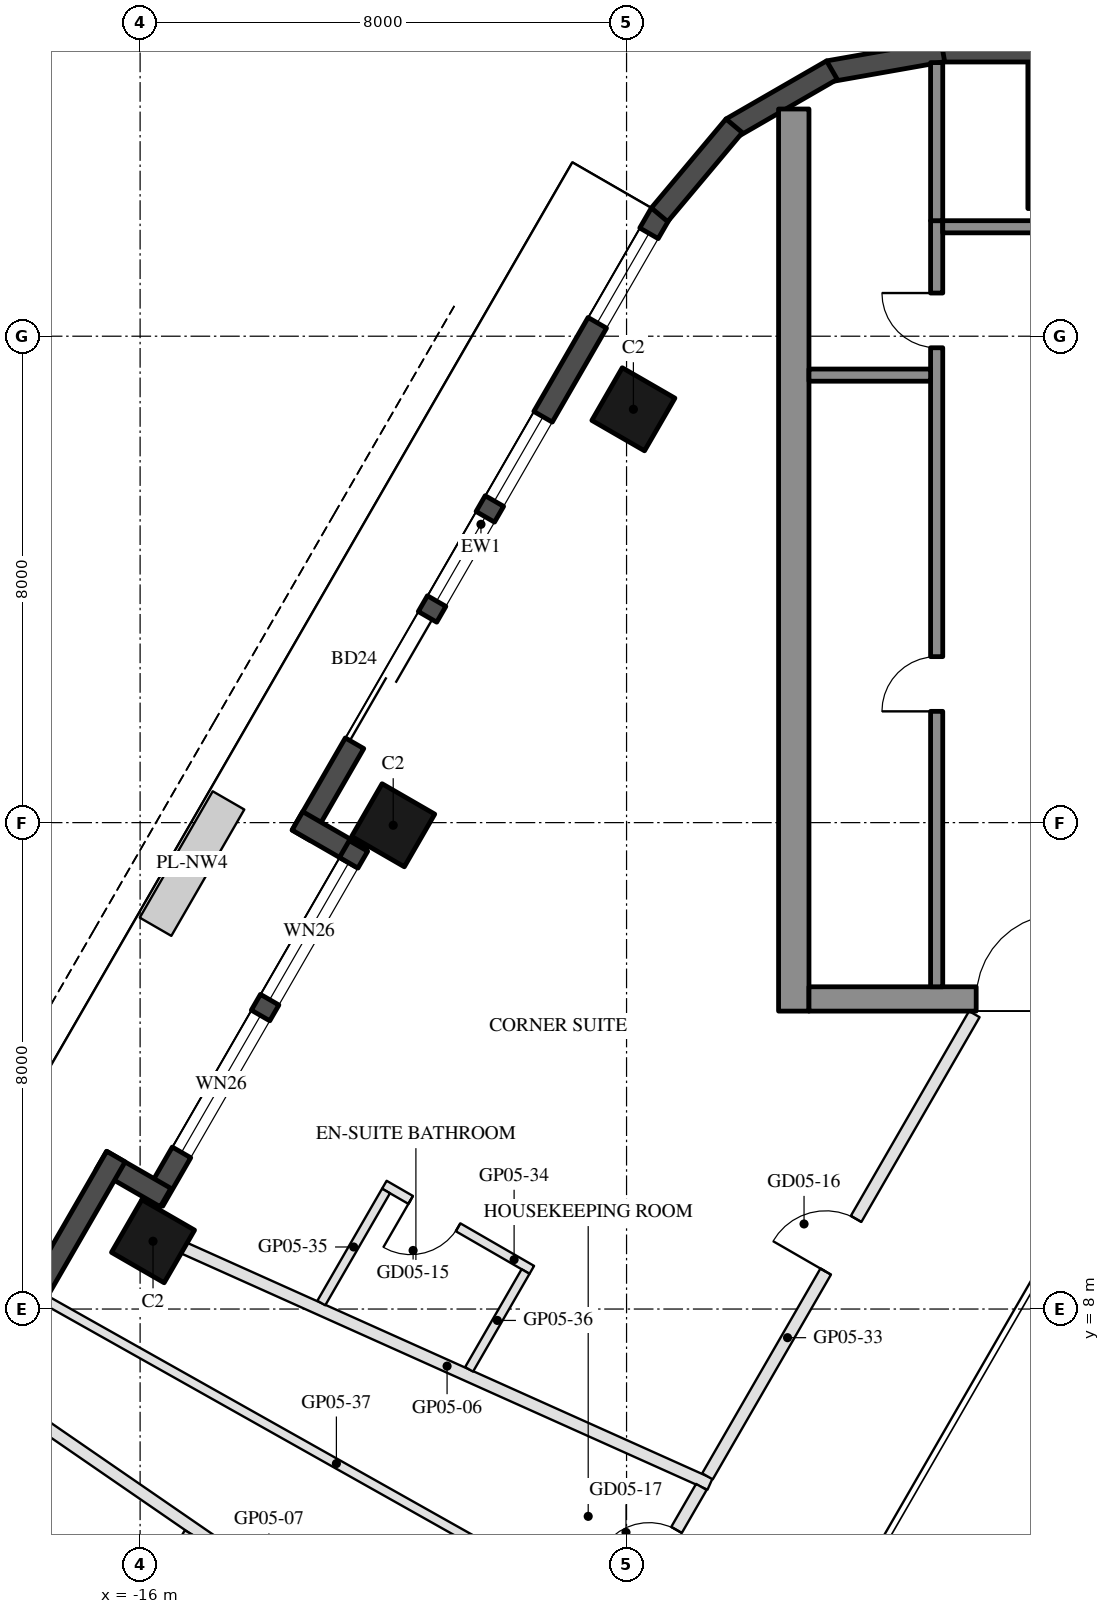
"""IFC4 building model, lengths in metres.
Left out: names, types, materials, properties, quantities, classifications, styles, units other than length and angle.
Written with IfcOpenShell. Run it as: python <this file> out.ifc"""

import sys

from ifc_helpers import new_model, si_unit, direction, frame, frame_2d, origin, origin_2d, place, context, subcontext, project, spatial, rectangle, hollow_rectangle, extrude, element, fill, save


model = new_model("IFC4")
c1 = context("Model", 3, precision=1e-05, world=origin(), true_north=direction((0.0, 1.0)))
c2 = subcontext(c1, "Body", "Model", "MODEL_VIEW")
j1 = project(units=[si_unit("LENGTHUNIT", "METRE"), si_unit("PLANEANGLEUNIT", "RADIAN")], contexts=[c1])
p1 = place(None, origin())
s1 = spatial("IfcSite", under=j1, at=p1, CompositionType="ELEMENT")
p2 = place(p1, origin())
s2 = spatial("IfcBuilding", under=s1, at=p2, CompositionType="ELEMENT")
p3 = place(p2, frame((0.0, 0.0, 79.8)))
s3 = spatial("IfcBuildingStorey", under=s2, at=p3, CompositionType="ELEMENT", Elevation=79.8)
for number, where, z_axis, x_axis in (
    (1, (-7.888, 22.798, 0.0), (0.0, 0.0, 1.0), (0.5, 0.866, 0.0)),
    (2, (-11.838, 15.957, 0.0), (0.0, 0.0, 1.0), (0.5, 0.866, 0.0)),
    (3, (-15.788, 9.115, 0.0), (0.0, 0.0, 1.0), (0.5, 0.866, 0.0)),
):
    element("IfcColumn", number, at=place(p3, frame(where, z_axis=z_axis, x_axis=x_axis)), inside=s3, PredefinedType="COLUMN", context=c2, shape_type="SweptSolid", body=[
        extrude(hollow_rectangle(XDim=1.0, YDim=1.0, WallThickness=0.045, at=origin_2d()), origin(), (0.0, 0.0, 1.0), 3.7),
    ])
p4 = place(p3, frame((0.0, 27.3, 0.0), z_axis=(0.0, 0.0, 1.0), x_axis=(1.0, 0.0, 0.0)))
e4 = element("IfcColumn", 4, at=p4, inside=s3, PredefinedType="COLUMN", context=c2, shape_type="SweptSolid", body=[
    extrude(hollow_rectangle(XDim=2.8, YDim=2.4, WallThickness=0.07, at=origin_2d()), origin(), (0.0, 0.0, 1.0), 3.7),
])
p5 = place(p3, frame((-7.441, 26.022, 0.0), z_axis=(0.0, 0.0, 1.0), x_axis=(-0.499992533062, -0.86602971478, 0.0)))
e5 = element("IfcWall", 5, at=p5, inside=s3, PredefinedType="SOLIDWALL", context=c2, shape_type="SweptSolid", body=[
    extrude(rectangle(XDim=11.816, YDim=0.35, at=frame_2d((5.908, 0.0))), origin(), (0.0, 0.0, 1.0), 3.55),
])
p6 = place(p5, frame((0.381, 0.0, 0.3)))
e6 = element("IfcOpeningElement", 6, at=p6, cuts=e5, PredefinedType="OPENING", context=c2, shape_type="SweptSolid", body=[
    extrude(rectangle(XDim=1.7, YDim=2.65, at=frame_2d((0.85, 1.325))), frame((0.0, 0.185, 0.0), z_axis=(0.0, -1.0, 0.0), x_axis=(1.0, 0.0, 0.0)), (0.0, 0.0, 1.0), 0.37),
])
p7 = place(p5, frame((7.666, 0.0, 0.0)))
e7 = element("IfcOpeningElement", 7, at=p7, cuts=e5, PredefinedType="OPENING", context=c2, shape_type="SweptSolid", body=[
    extrude(rectangle(XDim=2.4, YDim=2.4, at=frame_2d((1.2, 1.2))), frame((0.0, 0.185, 0.0), z_axis=(0.0, -1.0, 0.0), x_axis=(1.0, 0.0, 0.0)), (0.0, 0.0, 1.0), 0.37),
])
p8 = place(p5, frame((3.865, 0.0, 0.3)))
e8 = element("IfcOpeningElement", 8, at=p8, cuts=e5, PredefinedType="OPENING", context=c2, shape_type="SweptSolid", body=[
    extrude(rectangle(XDim=1.6, YDim=2.65, at=frame_2d((0.8, 1.325))), frame((0.0, 0.185, 0.0), z_axis=(0.0, -1.0, 0.0), x_axis=(1.0, 0.0, 0.0)), (0.0, 0.0, 1.0), 0.37),
])
p9 = place(p5, frame((5.765, 0.0, 0.3)))
e9 = element("IfcOpeningElement", 9, at=p9, cuts=e5, PredefinedType="OPENING", context=c2, shape_type="SweptSolid", body=[
    extrude(rectangle(XDim=1.6, YDim=2.65, at=frame_2d((0.8, 1.325))), frame((0.0, 0.185, 0.0), z_axis=(0.0, -1.0, 0.0), x_axis=(1.0, 0.0, 0.0)), (0.0, 0.0, 1.0), 0.37),
])
p10 = place(p3, frame((-13.413, 16.029, 0.0), z_axis=(0.0, 0.0, 1.0), x_axis=(0.866005645448, -0.500034220881, 0.0)))
e10 = element("IfcWall", 10, at=p10, inside=s3, PredefinedType="SOLIDWALL", context=c2, shape_type="SweptSolid", body=[
    extrude(rectangle(XDim=1.22, YDim=0.35, at=frame_2d((0.61, 0.0))), origin(), (0.0, 0.0, 1.0), 3.55),
])
p11 = place(p3, frame((-12.409, 15.617, 0.0), z_axis=(0.0, 0.0, 1.0), x_axis=(-0.500003597184, -0.866023326939, 0.0)))
e11 = element("IfcWall", 11, at=p11, inside=s3, PredefinedType="SOLIDWALL", context=c2, shape_type="SweptSolid", body=[
    extrude(rectangle(XDim=6.74, YDim=0.35, at=frame_2d((3.37, 0.0))), origin(), (0.0, 0.0, 1.0), 3.55),
])
p12 = place(p11, frame((0.32, 0.0, 0.3)))
e12 = element("IfcOpeningElement", 12, at=p12, cuts=e11, PredefinedType="OPENING", context=c2, shape_type="SweptSolid", body=[
    extrude(rectangle(XDim=2.6, YDim=2.65, at=frame_2d((1.3, 1.325))), frame((0.0, 0.185, 0.0), z_axis=(0.0, -1.0, 0.0), x_axis=(1.0, 0.0, 0.0)), (0.0, 0.0, 1.0), 0.37),
])
p13 = place(p11, frame((3.22, 0.0, 0.3)))
e13 = element("IfcOpeningElement", 13, at=p13, cuts=e11, PredefinedType="OPENING", context=c2, shape_type="SweptSolid", body=[
    extrude(rectangle(XDim=2.6, YDim=2.65, at=frame_2d((1.3, 1.325))), frame((0.0, 0.185, 0.0), z_axis=(0.0, -1.0, 0.0), x_axis=(1.0, 0.0, 0.0)), (0.0, 0.0, 1.0), 0.37),
])
p14 = place(p3, frame((-15.581, 9.833, 0.0), z_axis=(0.0, 0.0, 1.0), x_axis=(-0.866055662726, 0.499947586314, 0.0)))
e14 = element("IfcWall", 14, at=p14, inside=s3, PredefinedType="SOLIDWALL", context=c2, shape_type="SweptSolid", body=[
    extrude(rectangle(XDim=1.22, YDim=0.35, at=frame_2d((0.61, 0.0))), origin(), (0.0, 0.0, 1.0), 3.55),
])
p15 = place(p3, frame((-16.398, 10.507, 0.0), z_axis=(0.0, 0.0, 1.0), x_axis=(-0.499999142773, -0.866025898704, 0.0)))
e15 = element("IfcWall", 15, at=p15, inside=s3, PredefinedType="SOLIDWALL", context=c2, shape_type="SweptSolid", body=[
    extrude(rectangle(XDim=9.7, YDim=0.35, at=frame_2d((4.85, 0.0))), origin(), (0.0, 0.0, 1.0), 3.55),
])
p16 = place(p15, frame((4.79, 0.0, 0.3)))
e16 = element("IfcOpeningElement", 16, at=p16, cuts=e15, PredefinedType="OPENING", context=c2, shape_type="SweptSolid", body=[
    extrude(rectangle(XDim=3.1, YDim=2.65, at=frame_2d((1.55, 1.325))), frame((0.0, 0.185, 0.0), z_axis=(0.0, -1.0, 0.0), x_axis=(1.0, 0.0, 0.0)), (0.0, 0.0, 1.0), 0.37),
])
p17 = place(p3, frame((2.829, 28.685, 0.0), z_axis=(0.0, 0.0, 1.0), x_axis=(-1.0, 0.0, 0.0)))
e17 = element("IfcWall", 17, at=p17, inside=s3, PredefinedType="SOLIDWALL", context=c2, shape_type="SweptSolid", body=[
    extrude(rectangle(XDim=5.658, YDim=0.35, at=frame_2d((2.829, 0.0))), origin(), (0.0, 0.0, 1.0), 3.55),
])
for number, where, z_axis, x_axis in (
    (18, (-2.799, 28.688, 0.0), (0.0, 0.0, 1.0), (-0.985, -0.174, 0.0)),
    (19, (-4.623, 28.377, 0.0), (0.0, 0.0, 1.0), (-0.866, -0.5, 0.0)),
):
    element("IfcWall", number, at=place(p3, frame(where, z_axis=z_axis, x_axis=x_axis)), inside=s3, PredefinedType="SOLIDWALL", context=c2, shape_type="SweptSolid", body=[
        extrude(rectangle(XDim=1.91, YDim=0.35, at=frame_2d((0.955, 0.0))), origin(), (0.0, 0.0, 1.0), 3.55),
    ])
p18 = place(p3, frame((-6.23, 27.461, 0.0), z_axis=(0.0, 0.0, 1.0), x_axis=(-0.642808304945, -0.766027077259, 0.0)))
e20 = element("IfcWall", 20, at=p18, inside=s3, PredefinedType="SOLIDWALL", context=c2, shape_type="SweptSolid", body=[
    extrude(rectangle(XDim=1.91, YDim=0.35, at=frame_2d((0.955, 0.0))), origin(), (0.0, 0.0, 1.0), 3.55),
])
p19 = place(p3, frame((-5.25, 12.9, 0.0), z_axis=(0.0, 0.0, 1.0), x_axis=(0.0, 1.0, 0.0)))
e21 = element("IfcWall", 21, at=p19, inside=s3, PredefinedType="SHEAR", context=c2, shape_type="SweptSolid", body=[
    extrude(rectangle(XDim=14.837, YDim=0.5, at=frame_2d((7.418, 0.0))), origin(), (0.0, 0.0, 1.0), 3.5),
])
p20 = place(p3, frame((5.0, 13.1, 0.0), z_axis=(0.0, 0.0, 1.0), x_axis=(-1.0, 0.0, 0.0)))
e22 = element("IfcWall", 22, at=p20, inside=s3, PredefinedType="SHEAR", context=c2, shape_type="SweptSolid", body=[
    extrude(rectangle(XDim=10.0, YDim=0.4, at=frame_2d((5.0, 0.0))), origin(), (0.0, 0.0, 1.0), 3.5),
])
p21 = place(p20, frame((3.55, 0.0, 0.0)))
e23 = element("IfcOpeningElement", 23, at=p21, cuts=e22, PredefinedType="OPENING", context=c2, shape_type="SweptSolid", body=[
    extrude(rectangle(XDim=1.1, YDim=2.1, at=frame_2d((0.55, 1.05))), frame((0.0, 0.21, 0.0), z_axis=(0.0, -1.0, 0.0), x_axis=(1.0, 0.0, 0.0)), (0.0, 0.0, 1.0), 0.42),
])
p22 = place(p20, frame((5.85, 0.0, 0.0)))
e24 = element("IfcOpeningElement", 24, at=p22, cuts=e22, PredefinedType="OPENING", context=c2, shape_type="SweptSolid", body=[
    extrude(rectangle(XDim=1.4, YDim=2.1, at=frame_2d((0.7, 1.05))), frame((0.0, 0.21, 0.0), z_axis=(0.0, -1.0, 0.0), x_axis=(1.0, 0.0, 0.0)), (0.0, 0.0, 1.0), 0.42),
])
p23 = place(p3, frame((-2.9, 13.3, 0.0), z_axis=(0.0, 0.0, 1.0), x_axis=(0.0, 1.0, 0.0)))
e25 = element("IfcWall", 25, at=p23, inside=s3, PredefinedType="SHEAR", context=c2, shape_type="SweptSolid", body=[
    extrude(rectangle(XDim=12.6, YDim=0.2, at=frame_2d((6.3, 0.0))), origin(), (0.0, 0.0, 1.0), 3.5),
])
p24 = place(p23, frame((4.53, 0.0, 0.0)))
e26 = element("IfcOpeningElement", 26, at=p24, cuts=e25, PredefinedType="OPENING", context=c2, shape_type="SweptSolid", body=[
    extrude(rectangle(XDim=0.9, YDim=2.1, at=frame_2d((0.45, 1.05))), frame((0.0, 0.11, 0.0), z_axis=(0.0, -1.0, 0.0), x_axis=(1.0, 0.0, 0.0)), (0.0, 0.0, 1.0), 0.22),
])
p25 = place(p23, frame((10.51, 0.0, 0.0)))
e27 = element("IfcOpeningElement", 27, at=p25, cuts=e25, PredefinedType="OPENING", context=c2, shape_type="SweptSolid", body=[
    extrude(rectangle(XDim=0.9, YDim=2.1, at=frame_2d((0.45, 1.05))), frame((0.0, 0.11, 0.0), z_axis=(0.0, -1.0, 0.0), x_axis=(1.0, 0.0, 0.0)), (0.0, 0.0, 1.0), 0.22),
])
p26 = place(p3, frame((-0.4, 25.8, 0.0), z_axis=(0.0, 0.0, 1.0), x_axis=(-1.0, 0.0, 0.0)))
e28 = element("IfcWall", 28, at=p26, inside=s3, PredefinedType="SHEAR", context=c2, shape_type="SweptSolid", body=[
    extrude(rectangle(XDim=2.4, YDim=0.2, at=frame_2d((1.2, 0.0))), origin(), (0.0, 0.0, 1.0), 3.5),
])
p27 = place(p3, frame((-3.0, 23.36, 0.0), z_axis=(0.0, 0.0, 1.0), x_axis=(-1.0, 0.0, 0.0)))
e29 = element("IfcWall", 29, at=p27, inside=s3, PredefinedType="SHEAR", context=c2, shape_type="SweptSolid", body=[
    extrude(rectangle(XDim=2.0, YDim=0.2, at=frame_2d((1.0, 0.0))), origin(), (0.0, 0.0, 1.0), 3.5),
])
p28 = place(p3, frame((-2.9, 25.9, 0.0), z_axis=(0.0, 0.0, 1.0), x_axis=(0.0, 1.0, 0.0)))
e30 = element("IfcWall", 30, at=p28, inside=s3, PredefinedType="SHEAR", context=c2, shape_type="SweptSolid", body=[
    extrude(rectangle(XDim=2.6, YDim=0.2, at=frame_2d((1.3, 0.0))), origin(), (0.0, 0.0, 1.0), 3.5),
])
p29 = place(p3, frame((-15.275, 9.002, 0.0), z_axis=(0.0, 0.0, 1.0), x_axis=(0.912310970981, -0.409498097954, 0.0)))
e31 = element("IfcWall", 31, at=p29, inside=s3, PredefinedType="PARTITIONING", context=c2, shape_type="SweptSolid", body=[
    extrude(rectangle(XDim=9.479, YDim=0.2, at=frame_2d((4.74, 0.0))), origin(), (0.0, 0.0, 1.0), 2.95),
])
p30 = place(p3, frame((-18.417, 6.661, 0.0), z_axis=(0.0, 0.0, 1.0), x_axis=(0.823524858714, -0.56728018393, 0.0)))
e32 = element("IfcWall", 32, at=p30, inside=s3, PredefinedType="PARTITIONING", context=c2, shape_type="SweptSolid", body=[
    extrude(rectangle(XDim=11.015, YDim=0.2, at=frame_2d((5.507, 0.0))), origin(), (0.0, 0.0, 1.0), 2.95),
])
p31 = place(p3, frame((-6.669, 5.249, 0.0), z_axis=(0.0, 0.0, 1.0), x_axis=(0.499992114976, 0.866029956157, 0.0)))
e33 = element("IfcWall", 33, at=p31, inside=s3, PredefinedType="PARTITIONING", context=c2, shape_type="SweptSolid", body=[
    extrude(rectangle(XDim=8.778, YDim=0.2, at=frame_2d((4.389, 0.0))), origin(), (0.0, 0.0, 1.0), 2.95),
])
p32 = place(p31, frame((3.889, 0.0, 0.0)))
e34 = element("IfcOpeningElement", 34, at=p32, cuts=e33, PredefinedType="OPENING", context=c2, shape_type="SweptSolid", body=[
    extrude(rectangle(XDim=1.0, YDim=2.1, at=frame_2d((0.5, 1.05))), frame((0.0, 0.11, 0.0), z_axis=(0.0, -1.0, 0.0), x_axis=(1.0, 0.0, 0.0)), (0.0, 0.0, 1.0), 0.22),
])
p33 = place(p3, frame((-9.558, 8.645, 0.0), z_axis=(0.0, 0.0, 1.0), x_axis=(-0.866034573852, 0.49998411664, 0.0)))
e35 = element("IfcWall", 35, at=p33, inside=s3, PredefinedType="PARTITIONING", context=c2, shape_type="SweptSolid", body=[
    extrude(rectangle(XDim=2.8, YDim=0.15, at=frame_2d((1.4, 0.0))), origin(), (0.0, 0.0, 1.0), 3.55),
])
p34 = place(p33, frame((1.4, 0.0, 0.0)))
e36 = element("IfcOpeningElement", 36, at=p34, cuts=e35, PredefinedType="OPENING", context=c2, shape_type="SweptSolid", body=[
    extrude(rectangle(XDim=0.9, YDim=2.1, at=frame_2d((0.45, 1.05))), frame((0.0, 0.085, 0.0), z_axis=(0.0, -1.0, 0.0), x_axis=(1.0, 0.0, 0.0)), (0.0, 0.0, 1.0), 0.17),
])
p35 = place(p3, frame((-11.956, 9.942, 0.0), z_axis=(0.0, 0.0, 1.0), x_axis=(-0.50001378257, -0.866017446268, 0.0)))
e37 = element("IfcWall", 37, at=p35, inside=s3, PredefinedType="PARTITIONING", context=c2, shape_type="SweptSolid", body=[
    extrude(rectangle(XDim=2.128, YDim=0.15, at=frame_2d((1.064, 0.0))), origin(), (0.0, 0.0, 1.0), 3.55),
])
p36 = place(p3, frame((-9.661, 8.617, 0.0), z_axis=(0.0, 0.0, 1.0), x_axis=(-0.499984136491, -0.866034562392, 0.0)))
e38 = element("IfcWall", 38, at=p36, inside=s3, PredefinedType="PARTITIONING", context=c2, shape_type="SweptSolid", body=[
    extrude(rectangle(XDim=1.857, YDim=0.15, at=frame_2d((0.929, 0.0))), origin(), (0.0, 0.0, 1.0), 3.55),
])
p37 = place(p3, frame((-17.557, 8.15, 0.0), z_axis=(0.0, 0.0, 1.0), x_axis=(0.87154168957, -0.490321408202, 0.0)))
e39 = element("IfcWall", 39, at=p37, inside=s3, PredefinedType="PARTITIONING", context=c2, shape_type="SweptSolid", body=[
    extrude(rectangle(XDim=10.981, YDim=0.15, at=frame_2d((5.49, 0.0))), origin(), (0.0, 0.0, 1.0), 2.96),
])
p38 = place(p3, frame((-8.037, 2.88, 0.0), z_axis=(0.0, 0.0, 1.0), x_axis=(0.500025521233, 0.866010668592, 0.0)))
e40 = element("IfcWall", 40, at=p38, inside=s3, PredefinedType="PARTITIONING", context=c2, shape_type="SweptSolid", body=[
    extrude(rectangle(XDim=2.533, YDim=0.2, at=frame_2d((1.267, 0.0))), origin(), (0.0, 0.0, 1.0), 2.95),
])
p39 = place(p38, frame((0.817, 0.0, 0.0)))
e41 = element("IfcOpeningElement", 41, at=p39, cuts=e40, PredefinedType="OPENING", context=c2, shape_type="SweptSolid", body=[
    extrude(rectangle(XDim=0.9, YDim=2.1, at=frame_2d((0.45, 1.05))), frame((0.0, 0.11, 0.0), z_axis=(0.0, -1.0, 0.0), x_axis=(1.0, 0.0, 0.0)), (0.0, 0.0, 1.0), 0.22),
])
p40 = place(p3, frame((-15.2, 4.323, 0.0), z_axis=(0.0, 0.0, 1.0), x_axis=(-0.499974592989, -0.866040072032, 0.0)))
e42 = element("IfcWall", 42, at=p40, inside=s3, PredefinedType="PARTITIONING", context=c2, shape_type="SweptSolid", body=[
    extrude(rectangle(XDim=2.067, YDim=0.15, at=frame_2d((1.034, 0.0))), origin(), (0.0, 0.0, 1.0), 2.95),
])
p41 = place(p6, origin())
e43 = element("IfcWindow", 43, at=p41, inside=s3, PartitioningType="SINGLE_PANEL", PredefinedType="WINDOW", context=c2, shape_type="SweptSolid", body=[
    extrude(rectangle(XDim=1.7, YDim=2.65, at=frame_2d((0.85, 1.325))), frame((0.0, 0.03, 0.0), z_axis=(0.0, -1.0, 0.0), x_axis=(1.0, 0.0, 0.0)), (0.0, 0.0, 1.0), 0.06),
])
fill(e6, e43)
p42 = place(p7, frame((2.4, 0.0, 0.0), z_axis=(0.0, 0.0, 1.0), x_axis=(-1.0, 0.0, 0.0)))
e44 = element("IfcDoor", 44, at=p42, inside=s3, OperationType="SLIDING_TO_LEFT", PredefinedType="DOOR", context=c2, shape_type="SweptSolid", body=[
    extrude(rectangle(XDim=2.4, YDim=2.4, at=frame_2d((1.2, 1.2))), frame((0.0, 0.025, 0.0), z_axis=(0.0, -1.0, 0.0), x_axis=(1.0, 0.0, 0.0)), (0.0, 0.0, 1.0), 0.05),
])
fill(e7, e44)
p43 = place(p8, origin())
e45 = element("IfcWindow", 45, at=p43, inside=s3, PartitioningType="SINGLE_PANEL", PredefinedType="WINDOW", context=c2, shape_type="SweptSolid", body=[
    extrude(rectangle(XDim=1.6, YDim=2.65, at=frame_2d((0.8, 1.325))), frame((0.0, 0.03, 0.0), z_axis=(0.0, -1.0, 0.0), x_axis=(1.0, 0.0, 0.0)), (0.0, 0.0, 1.0), 0.06),
])
fill(e8, e45)
p44 = place(p9, origin())
e46 = element("IfcWindow", 46, at=p44, inside=s3, PartitioningType="SINGLE_PANEL", PredefinedType="WINDOW", context=c2, shape_type="SweptSolid", body=[
    extrude(rectangle(XDim=1.6, YDim=2.65, at=frame_2d((0.8, 1.325))), frame((0.0, 0.03, 0.0), z_axis=(0.0, -1.0, 0.0), x_axis=(1.0, 0.0, 0.0)), (0.0, 0.0, 1.0), 0.06),
])
fill(e9, e46)
p45 = place(p12, origin())
e47 = element("IfcWindow", 47, at=p45, inside=s3, PartitioningType="SINGLE_PANEL", PredefinedType="WINDOW", context=c2, shape_type="SweptSolid", body=[
    extrude(rectangle(XDim=2.6, YDim=2.65, at=frame_2d((1.3, 1.325))), frame((0.0, 0.03, 0.0), z_axis=(0.0, -1.0, 0.0), x_axis=(1.0, 0.0, 0.0)), (0.0, 0.0, 1.0), 0.06),
])
fill(e12, e47)
p46 = place(p13, origin())
e48 = element("IfcWindow", 48, at=p46, inside=s3, PartitioningType="SINGLE_PANEL", PredefinedType="WINDOW", context=c2, shape_type="SweptSolid", body=[
    extrude(rectangle(XDim=2.6, YDim=2.65, at=frame_2d((1.3, 1.325))), frame((0.0, 0.03, 0.0), z_axis=(0.0, -1.0, 0.0), x_axis=(1.0, 0.0, 0.0)), (0.0, 0.0, 1.0), 0.06),
])
fill(e13, e48)
p47 = place(p24, origin())
e49 = element("IfcDoor", 49, at=p47, inside=s3, OperationType="SINGLE_SWING_LEFT", PredefinedType="DOOR", context=c2, shape_type="SweptSolid", body=[
    extrude(rectangle(XDim=0.9, YDim=2.1, at=frame_2d((0.45, 1.05))), frame((0.0, 0.025, 0.0), z_axis=(0.0, -1.0, 0.0), x_axis=(1.0, 0.0, 0.0)), (0.0, 0.0, 1.0), 0.05),
])
fill(e26, e49)
p48 = place(p25, origin())
e50 = element("IfcDoor", 50, at=p48, inside=s3, OperationType="SINGLE_SWING_RIGHT", PredefinedType="DOOR", context=c2, shape_type="SweptSolid", body=[
    extrude(rectangle(XDim=0.9, YDim=2.1, at=frame_2d((0.45, 1.05))), frame((0.0, 0.025, 0.0), z_axis=(0.0, -1.0, 0.0), x_axis=(1.0, 0.0, 0.0)), (0.0, 0.0, 1.0), 0.05),
])
fill(e27, e50)
p49 = place(p22, frame((1.4, 0.0, 0.0), z_axis=(0.0, 0.0, 1.0), x_axis=(-1.0, 0.0, 0.0)))
e51 = element("IfcDoor", 51, at=p49, inside=s3, OperationType="DOUBLE_DOOR_SINGLE_SWING", PredefinedType="DOOR", context=c2, shape_type="SweptSolid", body=[
    extrude(rectangle(XDim=1.4, YDim=2.1, at=frame_2d((0.7, 1.05))), frame((0.0, 0.025, 0.0), z_axis=(0.0, -1.0, 0.0), x_axis=(1.0, 0.0, 0.0)), (0.0, 0.0, 1.0), 0.05),
])
fill(e24, e51)
p50 = place(p34, origin())
e52 = element("IfcDoor", 52, at=p50, inside=s3, OperationType="SINGLE_SWING_RIGHT", PredefinedType="DOOR", context=c2, shape_type="SweptSolid", body=[
    extrude(rectangle(XDim=0.9, YDim=2.1, at=frame_2d((0.45, 1.05))), frame((0.0, 0.025, 0.0), z_axis=(0.0, -1.0, 0.0), x_axis=(1.0, 0.0, 0.0)), (0.0, 0.0, 1.0), 0.05),
])
fill(e36, e52)
p51 = place(p32, origin())
e53 = element("IfcDoor", 53, at=p51, inside=s3, OperationType="SINGLE_SWING_LEFT", PredefinedType="DOOR", context=c2, shape_type="SweptSolid", body=[
    extrude(rectangle(XDim=1.0, YDim=2.1, at=frame_2d((0.5, 1.05))), frame((0.0, 0.025, 0.0), z_axis=(0.0, -1.0, 0.0), x_axis=(1.0, 0.0, 0.0)), (0.0, 0.0, 1.0), 0.05),
])
fill(e34, e53)
p52 = place(p39, origin())
e54 = element("IfcDoor", 54, at=p52, inside=s3, OperationType="SINGLE_SWING_LEFT", PredefinedType="DOOR", context=c2, shape_type="SweptSolid", body=[
    extrude(rectangle(XDim=0.9, YDim=2.1, at=frame_2d((0.45, 1.05))), frame((0.0, 0.025, 0.0), z_axis=(0.0, -1.0, 0.0), x_axis=(1.0, 0.0, 0.0)), (0.0, 0.0, 1.0), 0.05),
])
fill(e41, e54)
save(model, sys.argv[1])
